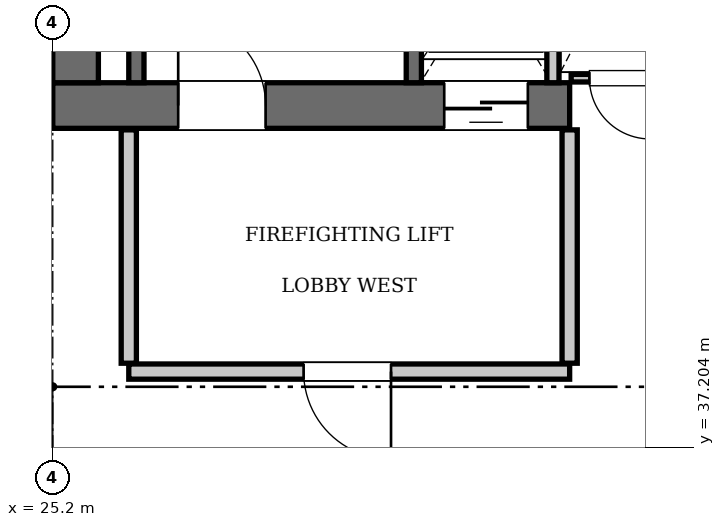
"""IFC4 building model, lengths in metres.
Left out: names, types, materials, properties, quantities, classifications, styles, units other than length and angle.
Written with IfcOpenShell. Run it as: python <this file> out.ifc"""

import sys

from ifc_helpers import new_model, si_unit, direction, frame, frame_2d, origin, place, context, subcontext, project, spatial, rectangle, extrude, element, fill, save


model = new_model("IFC4")
c1 = context("Model", 3, precision=1e-05, world=origin(), true_north=direction((0.0, 1.0)))
c2 = subcontext(c1, "Body", "Model", "MODEL_VIEW")
j1 = project(units=[si_unit("LENGTHUNIT", "METRE"), si_unit("PLANEANGLEUNIT", "RADIAN")], contexts=[c1])
p1 = place(None, origin())
s1 = spatial("IfcSite", under=j1, at=p1, CompositionType="ELEMENT")
p2 = place(p1, origin())
s2 = spatial("IfcBuilding", under=s1, at=p2, CompositionType="ELEMENT")
p3 = place(p2, frame((0.0, 0.0, 297.15)))
s3 = spatial("IfcBuildingStorey", under=s2, at=p3, CompositionType="ELEMENT", Elevation=297.15)
p4 = place(p3, frame((25.2, 41.7, 0.0), z_axis=(0.0, 0.0, 1.0), x_axis=(1.0, 0.0, 0.0)))
e1 = element("IfcWall", 1, at=p4, inside=s3, PredefinedType="SHEAR", context=c2, shape_type="SweptSolid", body=[
    extrude(rectangle(XDim=6.8, YDim=0.6, at=frame_2d((3.4, 0.0))), origin(), (0.0, 0.0, 1.0), 3.85),
])
p5 = place(p4, frame((1.65, 0.0, 0.0)))
e2 = element("IfcOpeningElement", 2, at=p5, cuts=e1, PredefinedType="OPENING", context=c2, shape_type="SweptSolid", body=[
    extrude(rectangle(XDim=1.15, YDim=2.15, at=frame_2d((0.575, 1.075))), frame((0.0, 0.31, 0.0), z_axis=(0.0, -1.0, 0.0), x_axis=(1.0, 0.0, 0.0)), (0.0, 0.0, 1.0), 0.62),
])
p6 = place(p4, frame((5.15, 0.0, 0.0)))
e3 = element("IfcOpeningElement", 3, at=p6, cuts=e1, PredefinedType="OPENING", context=c2, shape_type="SweptSolid", body=[
    extrude(rectangle(XDim=1.1, YDim=2.2, at=frame_2d((0.55, 1.1))), frame((0.0, 0.31, 0.0), z_axis=(0.0, -1.0, 0.0), x_axis=(1.0, 0.0, 0.0)), (0.0, 0.0, 1.0), 0.62),
])
p7 = place(p3, frame((25.5, 42.0, 0.0), z_axis=(0.0, 0.0, 1.0), x_axis=(0.0, 1.0, 0.0)))
e4 = element("IfcWall", 4, at=p7, inside=s3, PredefinedType="SHEAR", context=c2, shape_type="SweptSolid", body=[
    extrude(rectangle(XDim=2.2, YDim=0.6, at=frame_2d((1.1, 0.0))), origin(), (0.0, 0.0, 1.0), 3.85),
])
p8 = place(p3, frame((29.95, 42.0, 0.0), z_axis=(0.0, 0.0, 1.0), x_axis=(0.0, 1.0, 0.0)))
e5 = element("IfcWall", 5, at=p8, inside=s3, PredefinedType="SOLIDWALL", context=c2, shape_type="SweptSolid", body=[
    extrude(rectangle(XDim=9.15, YDim=0.2, at=frame_2d((4.575, 0.0))), origin(), (0.0, 0.0, 1.0), 3.61),
])
p9 = place(p3, frame((26.3, 42.0, 0.0), z_axis=(0.0, 0.0, 1.0), x_axis=(0.0, 1.0, 0.0)))
e6 = element("IfcWall", 6, at=p9, inside=s3, PredefinedType="SOLIDWALL", context=c2, shape_type="SweptSolid", body=[
    extrude(rectangle(XDim=9.12, YDim=0.2, at=frame_2d((4.56, 0.0))), origin(), (0.0, 0.0, 1.0), 3.61),
])
p10 = place(p3, frame((31.78, 42.0, 0.0), z_axis=(0.0, 0.0, 1.0), x_axis=(0.0, 1.0, 0.0)))
e7 = element("IfcWall", 7, at=p10, inside=s3, PredefinedType="SOLIDWALL", context=c2, shape_type="SweptSolid", body=[
    extrude(rectangle(XDim=2.74, YDim=0.16, at=frame_2d((1.37, 0.0))), origin(), (0.0, 0.0, 1.0), 3.61),
])
p11 = place(p3, frame((26.2, 38.2, 0.0), z_axis=(0.0, 0.0, 1.0), x_axis=(1.0, 0.0, 0.0)))
e8 = element("IfcWall", 8, at=p11, inside=s3, PredefinedType="PARTITIONING", context=c2, shape_type="SweptSolid", body=[
    extrude(rectangle(XDim=5.8, YDim=0.2, at=frame_2d((2.9, 0.0))), origin(), (0.0, 0.0, 1.0), 3.61),
])
p12 = place(p11, frame((2.3, 0.0, 0.0)))
e9 = element("IfcOpeningElement", 9, at=p12, cuts=e8, PredefinedType="OPENING", context=c2, shape_type="SweptSolid", body=[
    extrude(rectangle(XDim=1.15, YDim=2.15, at=frame_2d((0.575, 1.075))), frame((0.0, 0.11, 0.0), z_axis=(0.0, -1.0, 0.0), x_axis=(1.0, 0.0, 0.0)), (0.0, 0.0, 1.0), 0.22),
])
for number, where, z_axis, x_axis in (
    (10, (26.2, 38.31, 0.0), (0.0, 0.0, 1.0), (0.0, 1.0, 0.0)),
    (11, (32.0, 38.31, 0.0), (0.0, 0.0, 1.0), (0.0, 1.0, 0.0)),
):
    element("IfcWall", number, at=place(p3, frame(where, z_axis=z_axis, x_axis=x_axis)), inside=s3, PredefinedType="PARTITIONING", context=c2, shape_type="SweptSolid", body=[
        extrude(rectangle(XDim=3.07, YDim=0.2, at=frame_2d((1.535, 0.0))), origin(), (0.0, 0.0, 1.0), 3.61),
    ])
p13 = place(p3, frame((32.02, 42.06, 0.0), z_axis=(0.0, 0.0, 1.0), x_axis=(1.0, 0.0, 0.0)))
e12 = element("IfcWall", 12, at=p13, inside=s3, PredefinedType="PARTITIONING", context=c2, shape_type="SweptSolid", body=[
    extrude(rectangle(XDim=1.32, YDim=0.1, at=frame_2d((0.66, 0.0))), origin(), (0.0, 0.0, 1.0), 3.61),
])
p14 = place(p13, frame((0.24, 0.0, 0.0)))
e13 = element("IfcOpeningElement", 13, at=p14, cuts=e12, PredefinedType="OPENING", context=c2, shape_type="SweptSolid", body=[
    extrude(rectangle(XDim=0.8, YDim=2.05, at=frame_2d((0.4, 1.025))), frame((0.0, 0.06, 0.0), z_axis=(0.0, -1.0, 0.0), x_axis=(1.0, 0.0, 0.0)), (0.0, 0.0, 1.0), 0.12),
])
p15 = place(p5, origin())
e14 = element("IfcDoor", 14, at=p15, inside=s3, OperationType="SINGLE_SWING_LEFT", PredefinedType="DOOR", context=c2, shape_type="SweptSolid", body=[
    extrude(rectangle(XDim=1.15, YDim=2.15, at=frame_2d((0.575, 1.075))), frame((0.0, 0.025, 0.0), z_axis=(0.0, -1.0, 0.0), x_axis=(1.0, 0.0, 0.0)), (0.0, 0.0, 1.0), 0.05),
])
fill(e2, e14)
p16 = place(p6, frame((1.1, 0.0, 0.0), z_axis=(0.0, 0.0, 1.0), x_axis=(-1.0, 0.0, 0.0)))
e15 = element("IfcDoor", 15, at=p16, inside=s3, OperationType="SLIDING_TO_LEFT", PredefinedType="DOOR", context=c2, shape_type="SweptSolid", body=[
    extrude(rectangle(XDim=1.1, YDim=2.2, at=frame_2d((0.55, 1.1))), frame((0.0, 0.025, 0.0), z_axis=(0.0, -1.0, 0.0), x_axis=(1.0, 0.0, 0.0)), (0.0, 0.0, 1.0), 0.05),
])
fill(e3, e15)
p17 = place(p12, frame((1.15, 0.0, 0.0), z_axis=(0.0, 0.0, 1.0), x_axis=(-1.0, 0.0, 0.0)))
e16 = element("IfcDoor", 16, at=p17, inside=s3, OperationType="SINGLE_SWING_LEFT", PredefinedType="DOOR", context=c2, shape_type="SweptSolid", body=[
    extrude(rectangle(XDim=1.15, YDim=2.15, at=frame_2d((0.575, 1.075))), frame((0.0, 0.025, 0.0), z_axis=(0.0, -1.0, 0.0), x_axis=(1.0, 0.0, 0.0)), (0.0, 0.0, 1.0), 0.05),
])
fill(e9, e16)
p18 = place(p14, frame((0.8, 0.0, 0.0), z_axis=(0.0, 0.0, 1.0), x_axis=(-1.0, 0.0, 0.0)))
e17 = element("IfcDoor", 17, at=p18, inside=s3, OperationType="SINGLE_SWING_LEFT", PredefinedType="DOOR", context=c2, shape_type="SweptSolid", body=[
    extrude(rectangle(XDim=0.8, YDim=2.05, at=frame_2d((0.4, 1.025))), frame((0.0, 0.025, 0.0), z_axis=(0.0, -1.0, 0.0), x_axis=(1.0, 0.0, 0.0)), (0.0, 0.0, 1.0), 0.05),
])
fill(e13, e17)
save(model, sys.argv[1])
